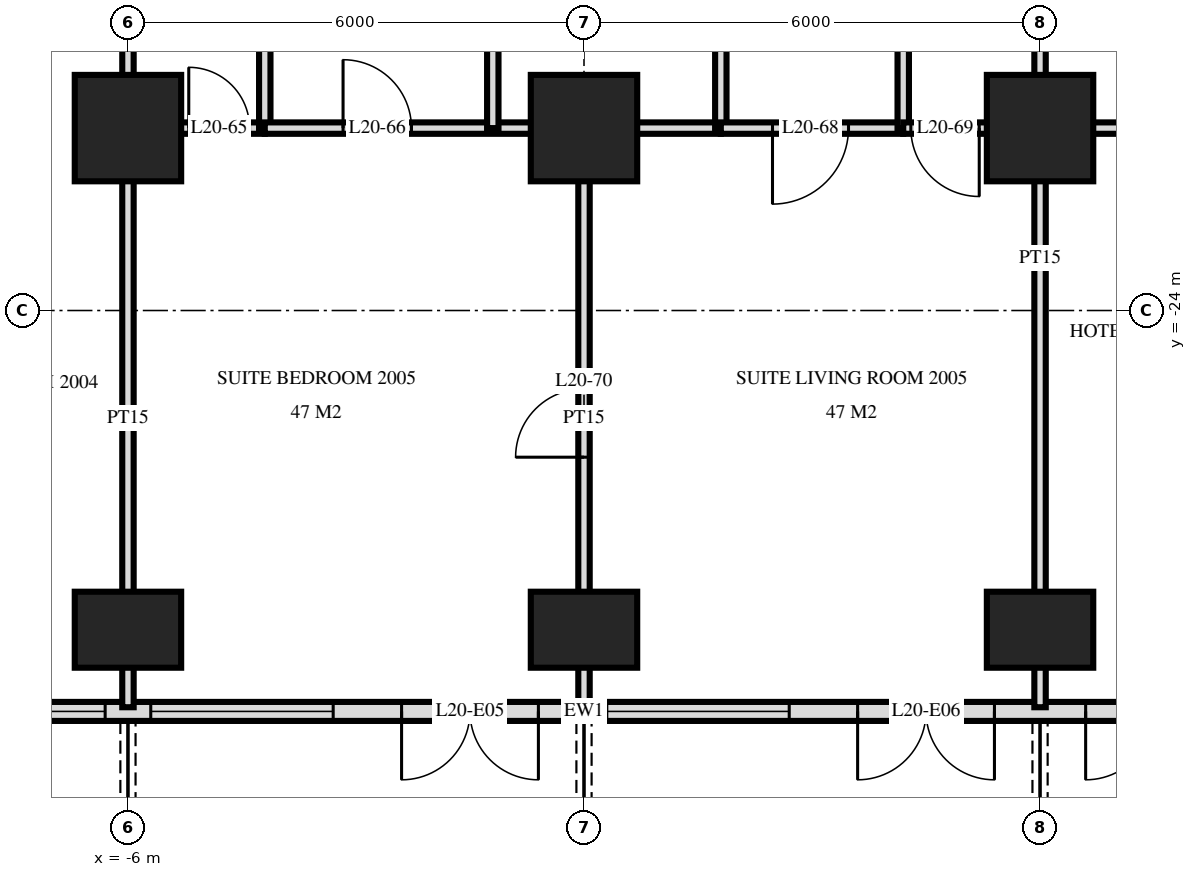
"""IFC4 building model, lengths in metres.
Left out: names, types, materials, properties, quantities, classifications, styles, units other than length and angle.
Written with IfcOpenShell. Run it as: python <this file> out.ifc"""

import sys

from ifc_helpers import new_model, si_unit, direction, frame, frame_2d, origin, origin_2d, place, context, subcontext, project, spatial, rectangle, extrude, element, fill, save


model = new_model("IFC4")
c1 = context("Model", 3, precision=1e-05, world=origin(), true_north=direction((0.0, 1.0)))
c2 = subcontext(c1, "Body", "Model", "MODEL_VIEW")
j1 = project(units=[si_unit("LENGTHUNIT", "METRE"), si_unit("PLANEANGLEUNIT", "RADIAN")], contexts=[c1])
p1 = place(None, origin())
s1 = spatial("IfcSite", under=j1, at=p1, CompositionType="ELEMENT")
p2 = place(p1, origin())
s2 = spatial("IfcBuilding", under=s1, at=p2, CompositionType="ELEMENT")
p3 = place(p2, frame((0.0, 0.0, 81.6)))
s3 = spatial("IfcBuildingStorey", under=s2, at=p3, CompositionType="ELEMENT", Elevation=81.6)
p4 = place(p3, frame((-6.0, -28.2, 0.0), z_axis=(0.0, 0.0, 1.0), x_axis=(1.0, 0.0, 0.0)))
e1 = element("IfcColumn", 1, at=p4, inside=s3, PredefinedType="COLUMN", context=c2, shape_type="SweptSolid", body=[
    extrude(rectangle(XDim=1.4, YDim=1.0, at=origin_2d()), origin(), (0.0, 0.0, 1.0), 3.6),
])
p5 = place(p3, frame((-6.0, -21.6, 0.0), z_axis=(0.0, 0.0, 1.0), x_axis=(1.0, 0.0, 0.0)))
e2 = element("IfcColumn", 2, at=p5, inside=s3, PredefinedType="COLUMN", context=c2, shape_type="SweptSolid", body=[
    extrude(rectangle(XDim=1.4, YDim=1.4, at=origin_2d()), origin(), (0.0, 0.0, 1.0), 3.6),
])
p6 = place(p3, frame((0.0, -28.2, 0.0), z_axis=(0.0, 0.0, 1.0), x_axis=(1.0, 0.0, 0.0)))
e3 = element("IfcColumn", 3, at=p6, inside=s3, PredefinedType="COLUMN", context=c2, shape_type="SweptSolid", body=[
    extrude(rectangle(XDim=1.4, YDim=1.0, at=origin_2d()), origin(), (0.0, 0.0, 1.0), 3.6),
])
p7 = place(p3, frame((0.0, -21.6, 0.0), z_axis=(0.0, 0.0, 1.0), x_axis=(1.0, 0.0, 0.0)))
e4 = element("IfcColumn", 4, at=p7, inside=s3, PredefinedType="COLUMN", context=c2, shape_type="SweptSolid", body=[
    extrude(rectangle(XDim=1.4, YDim=1.4, at=origin_2d()), origin(), (0.0, 0.0, 1.0), 3.6),
])
p8 = place(p3, frame((6.0, -28.2, 0.0), z_axis=(0.0, 0.0, 1.0), x_axis=(1.0, 0.0, 0.0)))
e5 = element("IfcColumn", 5, at=p8, inside=s3, PredefinedType="COLUMN", context=c2, shape_type="SweptSolid", body=[
    extrude(rectangle(XDim=1.4, YDim=1.0, at=origin_2d()), origin(), (0.0, 0.0, 1.0), 3.6),
])
p9 = place(p3, frame((6.0, -21.6, 0.0), z_axis=(0.0, 0.0, 1.0), x_axis=(1.0, 0.0, 0.0)))
e6 = element("IfcColumn", 6, at=p9, inside=s3, PredefinedType="COLUMN", context=c2, shape_type="SweptSolid", body=[
    extrude(rectangle(XDim=1.4, YDim=1.4, at=origin_2d()), origin(), (0.0, 0.0, 1.0), 3.6),
])
p10 = place(p3, frame((-28.775, -29.275, 0.0), z_axis=(0.0, 0.0, 1.0), x_axis=(1.0, 0.0, 0.0)))
e7 = element("IfcWall", 7, at=p10, inside=s3, PredefinedType="SOLIDWALL", context=c2, shape_type="SweptSolid", body=[
    extrude(rectangle(XDim=57.551, YDim=0.25, at=frame_2d((28.775, 0.0))), origin(), (0.0, 0.0, 1.0), 3.32),
])
p11 = place(p10, frame((0.575, 0.0, 0.0)))
e8 = element("IfcOpeningElement", 8, at=p11, cuts=e7, PredefinedType="OPENING", context=c2, shape_type="SweptSolid", body=[
    extrude(rectangle(XDim=1.8, YDim=2.4, at=frame_2d((0.9, 1.2))), frame((0.0, 0.135, 0.0), z_axis=(0.0, -1.0, 0.0), x_axis=(1.0, 0.0, 0.0)), (0.0, 0.0, 1.0), 0.27),
])
p12 = place(p10, frame((5.375, 0.0, 0.0)))
e9 = element("IfcOpeningElement", 9, at=p12, cuts=e7, PredefinedType="OPENING", context=c2, shape_type="SweptSolid", body=[
    extrude(rectangle(XDim=1.8, YDim=2.4, at=frame_2d((0.9, 1.2))), frame((0.0, 0.135, 0.0), z_axis=(0.0, -1.0, 0.0), x_axis=(1.0, 0.0, 0.0)), (0.0, 0.0, 1.0), 0.27),
])
p13 = place(p10, frame((8.075, 0.0, 0.3)))
e10 = element("IfcOpeningElement", 10, at=p13, cuts=e7, PredefinedType="OPENING", context=c2, shape_type="SweptSolid", body=[
    extrude(rectangle(XDim=2.4, YDim=2.1, at=frame_2d((1.2, 1.05))), frame((0.0, 0.135, 0.0), z_axis=(0.0, -1.0, 0.0), x_axis=(1.0, 0.0, 0.0)), (0.0, 0.0, 1.0), 0.27),
])
p14 = place(p10, frame((12.875, 0.0, 0.0)))
e11 = element("IfcOpeningElement", 11, at=p14, cuts=e7, PredefinedType="OPENING", context=c2, shape_type="SweptSolid", body=[
    extrude(rectangle(XDim=1.8, YDim=2.4, at=frame_2d((0.9, 1.2))), frame((0.0, 0.135, 0.0), z_axis=(0.0, -1.0, 0.0), x_axis=(1.0, 0.0, 0.0)), (0.0, 0.0, 1.0), 0.27),
])
p15 = place(p10, frame((17.375, 0.0, 0.0)))
e12 = element("IfcOpeningElement", 12, at=p15, cuts=e7, PredefinedType="OPENING", context=c2, shape_type="SweptSolid", body=[
    extrude(rectangle(XDim=1.8, YDim=2.4, at=frame_2d((0.9, 1.2))), frame((0.0, 0.135, 0.0), z_axis=(0.0, -1.0, 0.0), x_axis=(1.0, 0.0, 0.0)), (0.0, 0.0, 1.0), 0.27),
])
p16 = place(p10, frame((20.075, 0.0, 0.3)))
e13 = element("IfcOpeningElement", 13, at=p16, cuts=e7, PredefinedType="OPENING", context=c2, shape_type="SweptSolid", body=[
    extrude(rectangle(XDim=2.4, YDim=2.1, at=frame_2d((1.2, 1.05))), frame((0.0, 0.135, 0.0), z_axis=(0.0, -1.0, 0.0), x_axis=(1.0, 0.0, 0.0)), (0.0, 0.0, 1.0), 0.27),
])
p17 = place(p10, frame((23.075, 0.0, 0.3)))
e14 = element("IfcOpeningElement", 14, at=p17, cuts=e7, PredefinedType="OPENING", context=c2, shape_type="SweptSolid", body=[
    extrude(rectangle(XDim=2.4, YDim=2.1, at=frame_2d((1.2, 1.05))), frame((0.0, 0.135, 0.0), z_axis=(0.0, -1.0, 0.0), x_axis=(1.0, 0.0, 0.0)), (0.0, 0.0, 1.0), 0.27),
])
p18 = place(p10, frame((26.375, 0.0, 0.0)))
e15 = element("IfcOpeningElement", 15, at=p18, cuts=e7, PredefinedType="OPENING", context=c2, shape_type="SweptSolid", body=[
    extrude(rectangle(XDim=1.8, YDim=2.4, at=frame_2d((0.9, 1.2))), frame((0.0, 0.135, 0.0), z_axis=(0.0, -1.0, 0.0), x_axis=(1.0, 0.0, 0.0)), (0.0, 0.0, 1.0), 0.27),
])
p19 = place(p10, frame((29.075, 0.0, 0.3)))
e16 = element("IfcOpeningElement", 16, at=p19, cuts=e7, PredefinedType="OPENING", context=c2, shape_type="SweptSolid", body=[
    extrude(rectangle(XDim=2.4, YDim=2.1, at=frame_2d((1.2, 1.05))), frame((0.0, 0.135, 0.0), z_axis=(0.0, -1.0, 0.0), x_axis=(1.0, 0.0, 0.0)), (0.0, 0.0, 1.0), 0.27),
])
p20 = place(p10, frame((32.375, 0.0, 0.0)))
e17 = element("IfcOpeningElement", 17, at=p20, cuts=e7, PredefinedType="OPENING", context=c2, shape_type="SweptSolid", body=[
    extrude(rectangle(XDim=1.8, YDim=2.4, at=frame_2d((0.9, 1.2))), frame((0.0, 0.135, 0.0), z_axis=(0.0, -1.0, 0.0), x_axis=(1.0, 0.0, 0.0)), (0.0, 0.0, 1.0), 0.27),
])
p21 = place(p10, frame((35.375, 0.0, 0.0)))
e18 = element("IfcOpeningElement", 18, at=p21, cuts=e7, PredefinedType="OPENING", context=c2, shape_type="SweptSolid", body=[
    extrude(rectangle(XDim=1.8, YDim=2.4, at=frame_2d((0.9, 1.2))), frame((0.0, 0.135, 0.0), z_axis=(0.0, -1.0, 0.0), x_axis=(1.0, 0.0, 0.0)), (0.0, 0.0, 1.0), 0.27),
])
p22 = place(p10, frame((38.075, 0.0, 0.3)))
e19 = element("IfcOpeningElement", 19, at=p22, cuts=e7, PredefinedType="OPENING", context=c2, shape_type="SweptSolid", body=[
    extrude(rectangle(XDim=2.4, YDim=2.1, at=frame_2d((1.2, 1.05))), frame((0.0, 0.135, 0.0), z_axis=(0.0, -1.0, 0.0), x_axis=(1.0, 0.0, 0.0)), (0.0, 0.0, 1.0), 0.27),
])
p23 = place(p10, frame((41.375, 0.0, 0.0)))
e20 = element("IfcOpeningElement", 20, at=p23, cuts=e7, PredefinedType="OPENING", context=c2, shape_type="SweptSolid", body=[
    extrude(rectangle(XDim=1.8, YDim=2.4, at=frame_2d((0.9, 1.2))), frame((0.0, 0.135, 0.0), z_axis=(0.0, -1.0, 0.0), x_axis=(1.0, 0.0, 0.0)), (0.0, 0.0, 1.0), 0.27),
])
p24 = place(p10, frame((44.075, 0.0, 0.3)))
e21 = element("IfcOpeningElement", 21, at=p24, cuts=e7, PredefinedType="OPENING", context=c2, shape_type="SweptSolid", body=[
    extrude(rectangle(XDim=2.4, YDim=2.1, at=frame_2d((1.2, 1.05))), frame((0.0, 0.135, 0.0), z_axis=(0.0, -1.0, 0.0), x_axis=(1.0, 0.0, 0.0)), (0.0, 0.0, 1.0), 0.27),
])
p25 = place(p10, frame((47.075, 0.0, 0.3)))
e22 = element("IfcOpeningElement", 22, at=p25, cuts=e7, PredefinedType="OPENING", context=c2, shape_type="SweptSolid", body=[
    extrude(rectangle(XDim=2.4, YDim=2.1, at=frame_2d((1.2, 1.05))), frame((0.0, 0.135, 0.0), z_axis=(0.0, -1.0, 0.0), x_axis=(1.0, 0.0, 0.0)), (0.0, 0.0, 1.0), 0.27),
])
p26 = place(p10, frame((50.375, 0.0, 0.0)))
e23 = element("IfcOpeningElement", 23, at=p26, cuts=e7, PredefinedType="OPENING", context=c2, shape_type="SweptSolid", body=[
    extrude(rectangle(XDim=1.8, YDim=2.4, at=frame_2d((0.9, 1.2))), frame((0.0, 0.135, 0.0), z_axis=(0.0, -1.0, 0.0), x_axis=(1.0, 0.0, 0.0)), (0.0, 0.0, 1.0), 0.27),
])
p27 = place(p10, frame((53.375, 0.0, 0.0)))
e24 = element("IfcOpeningElement", 24, at=p27, cuts=e7, PredefinedType="OPENING", context=c2, shape_type="SweptSolid", body=[
    extrude(rectangle(XDim=1.8, YDim=2.4, at=frame_2d((0.9, 1.2))), frame((0.0, 0.135, 0.0), z_axis=(0.0, -1.0, 0.0), x_axis=(1.0, 0.0, 0.0)), (0.0, 0.0, 1.0), 0.27),
])
p28 = place(p3, frame((6.0, -29.22, 0.0), z_axis=(0.0, 0.0, 1.0), x_axis=(0.0, 1.0, 0.0)))
e25 = element("IfcWall", 25, at=p28, inside=s3, PredefinedType="PARTITIONING", context=c2, shape_type="SweptSolid", body=[
    extrude(rectangle(XDim=11.82, YDim=0.15, at=frame_2d((5.91, 0.0))), origin(), (0.0, 0.0, 1.0), 3.32),
])
p29 = place(p3, frame((4.2, -21.6, 0.0), z_axis=(0.0, 0.0, 1.0), x_axis=(0.0, 1.0, 0.0)))
e26 = element("IfcWall", 26, at=p29, inside=s3, PredefinedType="PARTITIONING", context=c2, shape_type="SweptSolid", body=[
    extrude(rectangle(XDim=4.2, YDim=0.15, at=frame_2d((2.1, 0.0))), origin(), (0.0, 0.0, 1.0), 3.32),
])
p30 = place(p3, frame((1.8, -21.6, 0.0), z_axis=(0.0, 0.0, 1.0), x_axis=(0.0, 1.0, 0.0)))
e27 = element("IfcWall", 27, at=p30, inside=s3, PredefinedType="PARTITIONING", context=c2, shape_type="SweptSolid", body=[
    extrude(rectangle(XDim=4.2, YDim=0.15, at=frame_2d((2.1, 0.0))), origin(), (0.0, 0.0, 1.0), 3.32),
])
p31 = place(p30, frame((1.58, 0.0, 0.0)))
e28 = element("IfcOpeningElement", 28, at=p31, cuts=e27, PredefinedType="OPENING", context=c2, shape_type="SweptSolid", body=[
    extrude(rectangle(XDim=1.0, YDim=2.1, at=frame_2d((0.5, 1.05))), frame((0.0, 0.085, 0.0), z_axis=(0.0, -1.0, 0.0), x_axis=(1.0, 0.0, 0.0)), (0.0, 0.0, 1.0), 0.17),
])
p32 = place(p3, frame((0.0, -29.22, 0.0), z_axis=(0.0, 0.0, 1.0), x_axis=(0.0, 1.0, 0.0)))
e29 = element("IfcWall", 29, at=p32, inside=s3, PredefinedType="PARTITIONING", context=c2, shape_type="SweptSolid", body=[
    extrude(rectangle(XDim=7.62, YDim=0.15, at=frame_2d((3.81, 0.0))), origin(), (0.0, 0.0, 1.0), 3.32),
])
p33 = place(p32, frame((3.29, 0.0, 0.0)))
e30 = element("IfcOpeningElement", 30, at=p33, cuts=e29, PredefinedType="OPENING", context=c2, shape_type="SweptSolid", body=[
    extrude(rectangle(XDim=0.9, YDim=2.1, at=frame_2d((0.45, 1.05))), frame((0.0, 0.085, 0.0), z_axis=(0.0, -1.0, 0.0), x_axis=(1.0, 0.0, 0.0)), (0.0, 0.0, 1.0), 0.17),
])
p34 = place(p3, frame((-1.2, -21.6, 0.0), z_axis=(0.0, 0.0, 1.0), x_axis=(0.0, 1.0, 0.0)))
e31 = element("IfcWall", 31, at=p34, inside=s3, PredefinedType="PARTITIONING", context=c2, shape_type="SweptSolid", body=[
    extrude(rectangle(XDim=4.2, YDim=0.15, at=frame_2d((2.1, 0.0))), origin(), (0.0, 0.0, 1.0), 3.32),
])
p35 = place(p3, frame((-4.2, -21.6, 0.0), z_axis=(0.0, 0.0, 1.0), x_axis=(0.0, 1.0, 0.0)))
e32 = element("IfcWall", 32, at=p35, inside=s3, PredefinedType="PLUMBINGWALL", context=c2, shape_type="SweptSolid", body=[
    extrude(rectangle(XDim=4.2, YDim=0.15, at=frame_2d((2.1, 0.0))), origin(), (0.0, 0.0, 1.0), 3.32),
])
p36 = place(p3, frame((-6.0, -29.22, 0.0), z_axis=(0.0, 0.0, 1.0), x_axis=(0.0, 1.0, 0.0)))
e33 = element("IfcWall", 33, at=p36, inside=s3, PredefinedType="PARTITIONING", context=c2, shape_type="SweptSolid", body=[
    extrude(rectangle(XDim=7.62, YDim=0.15, at=frame_2d((3.81, 0.0))), origin(), (0.0, 0.0, 1.0), 3.32),
])
p37 = place(p3, frame((-6.0, -21.6, 0.0), z_axis=(0.0, 0.0, 1.0), x_axis=(0.0, 1.0, 0.0)))
e34 = element("IfcWall", 34, at=p37, inside=s3, PredefinedType="PLUMBINGWALL", context=c2, shape_type="SweptSolid", body=[
    extrude(rectangle(XDim=4.2, YDim=0.15, at=frame_2d((2.1, 0.0))), origin(), (0.0, 0.0, 1.0), 3.32),
])
p38 = place(p3, frame((1.8, -21.6, 0.0), z_axis=(0.0, 0.0, 1.0), x_axis=(1.0, 0.0, 0.0)))
e35 = element("IfcWall", 35, at=p38, inside=s3, PredefinedType="PARTITIONING", context=c2, shape_type="SweptSolid", body=[
    extrude(rectangle(XDim=2.4, YDim=0.15, at=frame_2d((1.2, 0.0))), origin(), (0.0, 0.0, 1.0), 3.32),
])
p39 = place(p38, frame((0.68, 0.0, 0.0)))
e36 = element("IfcOpeningElement", 36, at=p39, cuts=e35, PredefinedType="OPENING", context=c2, shape_type="SweptSolid", body=[
    extrude(rectangle(XDim=1.0, YDim=2.1, at=frame_2d((0.5, 1.05))), frame((0.0, 0.085, 0.0), z_axis=(0.0, -1.0, 0.0), x_axis=(1.0, 0.0, 0.0)), (0.0, 0.0, 1.0), 0.17),
])
p40 = place(p3, frame((-4.2, -21.6, 0.0), z_axis=(0.0, 0.0, 1.0), x_axis=(1.0, 0.0, 0.0)))
e37 = element("IfcWall", 37, at=p40, inside=s3, PredefinedType="PARTITIONING", context=c2, shape_type="SweptSolid", body=[
    extrude(rectangle(XDim=6.0, YDim=0.15, at=frame_2d((3.0, 0.0))), origin(), (0.0, 0.0, 1.0), 3.32),
])
p41 = place(p40, frame((1.03, 0.0, 0.0)))
e38 = element("IfcOpeningElement", 38, at=p41, cuts=e37, PredefinedType="OPENING", context=c2, shape_type="SweptSolid", body=[
    extrude(rectangle(XDim=0.9, YDim=2.1, at=frame_2d((0.45, 1.05))), frame((0.0, 0.085, 0.0), z_axis=(0.0, -1.0, 0.0), x_axis=(1.0, 0.0, 0.0)), (0.0, 0.0, 1.0), 0.17),
])
p42 = place(p3, frame((4.2, -21.6, 0.0), z_axis=(0.0, 0.0, 1.0), x_axis=(1.0, 0.0, 0.0)))
e39 = element("IfcWall", 39, at=p42, inside=s3, PredefinedType="PARTITIONING", context=c2, shape_type="SweptSolid", body=[
    extrude(rectangle(XDim=3.5, YDim=0.15, at=frame_2d((1.75, 0.0))), origin(), (0.0, 0.0, 1.0), 3.32),
])
p43 = place(p42, frame((0.1, 0.0, 0.0)))
e40 = element("IfcOpeningElement", 40, at=p43, cuts=e39, PredefinedType="OPENING", context=c2, shape_type="SweptSolid", body=[
    extrude(rectangle(XDim=0.9, YDim=2.1, at=frame_2d((0.45, 1.05))), frame((0.0, 0.085, 0.0), z_axis=(0.0, -1.0, 0.0), x_axis=(1.0, 0.0, 0.0)), (0.0, 0.0, 1.0), 0.17),
])
p44 = place(p3, frame((-6.0, -21.6, 0.0), z_axis=(0.0, 0.0, 1.0), x_axis=(1.0, 0.0, 0.0)))
e41 = element("IfcWall", 41, at=p44, inside=s3, PredefinedType="PLUMBINGWALL", context=c2, shape_type="SweptSolid", body=[
    extrude(rectangle(XDim=1.8, YDim=0.15, at=frame_2d((0.9, 0.0))), origin(), (0.0, 0.0, 1.0), 3.32),
])
p45 = place(p44, frame((0.8, 0.0, 0.0)))
e42 = element("IfcOpeningElement", 42, at=p45, cuts=e41, PredefinedType="OPENING", context=c2, shape_type="SweptSolid", body=[
    extrude(rectangle(XDim=0.8, YDim=2.1, at=frame_2d((0.4, 1.05))), frame((0.0, 0.085, 0.0), z_axis=(0.0, -1.0, 0.0), x_axis=(1.0, 0.0, 0.0)), (0.0, 0.0, 1.0), 0.17),
])
p46 = place(p16, origin())
e43 = element("IfcWindow", 43, at=p46, inside=s3, PartitioningType="SINGLE_PANEL", PredefinedType="WINDOW", context=c2, shape_type="SweptSolid", body=[
    extrude(rectangle(XDim=2.4, YDim=2.1, at=frame_2d((1.2, 1.05))), frame((0.0, 0.03, 0.0), z_axis=(0.0, -1.0, 0.0), x_axis=(1.0, 0.0, 0.0)), (0.0, 0.0, 1.0), 0.06),
])
fill(e13, e43)
p47 = place(p17, origin())
e44 = element("IfcWindow", 44, at=p47, inside=s3, PartitioningType="SINGLE_PANEL", PredefinedType="WINDOW", context=c2, shape_type="SweptSolid", body=[
    extrude(rectangle(XDim=2.4, YDim=2.1, at=frame_2d((1.2, 1.05))), frame((0.0, 0.03, 0.0), z_axis=(0.0, -1.0, 0.0), x_axis=(1.0, 0.0, 0.0)), (0.0, 0.0, 1.0), 0.06),
])
fill(e14, e44)
p48 = place(p18, frame((0.9, 0.0, 0.0), z_axis=(0.0, 0.0, 1.0), x_axis=(-1.0, 0.0, 0.0)))
e45 = element("IfcDoor", 45, at=p48, inside=s3, OperationType="DOUBLE_DOOR_SINGLE_SWING", PredefinedType="DOOR", context=c2, shape_type="SweptSolid", body=[
    extrude(rectangle(XDim=1.8, YDim=2.4, at=frame_2d((0.0, 1.2))), frame((0.0, -0.025, 0.0), z_axis=(0.0, 1.0, 0.0), x_axis=(-1.0, 0.0, 0.0)), (0.0, 0.0, 1.0), 0.05),
])
fill(e15, e45)
p49 = place(p19, origin())
e46 = element("IfcWindow", 46, at=p49, inside=s3, PartitioningType="SINGLE_PANEL", PredefinedType="WINDOW", context=c2, shape_type="SweptSolid", body=[
    extrude(rectangle(XDim=2.4, YDim=2.1, at=frame_2d((1.2, 1.05))), frame((0.0, 0.03, 0.0), z_axis=(0.0, -1.0, 0.0), x_axis=(1.0, 0.0, 0.0)), (0.0, 0.0, 1.0), 0.06),
])
fill(e16, e46)
p50 = place(p20, frame((0.9, 0.0, 0.0), z_axis=(0.0, 0.0, 1.0), x_axis=(-1.0, 0.0, 0.0)))
e47 = element("IfcDoor", 47, at=p50, inside=s3, OperationType="DOUBLE_DOOR_SINGLE_SWING", PredefinedType="DOOR", context=c2, shape_type="SweptSolid", body=[
    extrude(rectangle(XDim=1.8, YDim=2.4, at=frame_2d((0.0, 1.2))), frame((0.0, -0.025, 0.0), z_axis=(0.0, 1.0, 0.0), x_axis=(-1.0, 0.0, 0.0)), (0.0, 0.0, 1.0), 0.05),
])
fill(e17, e47)
p51 = place(p21, frame((0.9, 0.0, 0.0), z_axis=(0.0, 0.0, 1.0), x_axis=(-1.0, 0.0, 0.0)))
e48 = element("IfcDoor", 48, at=p51, inside=s3, OperationType="DOUBLE_DOOR_SINGLE_SWING", PredefinedType="DOOR", context=c2, shape_type="SweptSolid", body=[
    extrude(rectangle(XDim=1.8, YDim=2.4, at=frame_2d((0.0, 1.2))), frame((0.0, -0.025, 0.0), z_axis=(0.0, 1.0, 0.0), x_axis=(-1.0, 0.0, 0.0)), (0.0, 0.0, 1.0), 0.05),
])
fill(e18, e48)
p52 = place(p45, origin())
e49 = element("IfcDoor", 49, at=p52, inside=s3, OperationType="SINGLE_SWING_RIGHT", PredefinedType="DOOR", context=c2, shape_type="SweptSolid", body=[
    extrude(rectangle(XDim=0.8, YDim=2.1, at=frame_2d((0.4, 1.05))), frame((0.0, 0.025, 0.0), z_axis=(0.0, -1.0, 0.0), x_axis=(1.0, 0.0, 0.0)), (0.0, 0.0, 1.0), 0.05),
])
fill(e42, e49)
p53 = place(p41, origin())
e50 = element("IfcDoor", 50, at=p53, inside=s3, OperationType="SINGLE_SWING_RIGHT", PredefinedType="DOOR", context=c2, shape_type="SweptSolid", body=[
    extrude(rectangle(XDim=0.9, YDim=2.1, at=frame_2d((0.45, 1.05))), frame((0.0, 0.025, 0.0), z_axis=(0.0, -1.0, 0.0), x_axis=(1.0, 0.0, 0.0)), (0.0, 0.0, 1.0), 0.05),
])
fill(e38, e50)
p54 = place(p39, frame((0.5, 0.0, 0.0), z_axis=(0.0, 0.0, 1.0), x_axis=(-1.0, 0.0, 0.0)))
e51 = element("IfcDoor", 51, at=p54, inside=s3, OperationType="SINGLE_SWING_LEFT", PredefinedType="DOOR", context=c2, shape_type="SweptSolid", body=[
    extrude(rectangle(XDim=1.0, YDim=2.1, at=frame_2d((0.0, 1.05))), frame((0.0, -0.025, 0.0), z_axis=(0.0, 1.0, 0.0), x_axis=(-1.0, 0.0, 0.0)), (0.0, 0.0, 1.0), 0.05),
])
fill(e36, e51)
p55 = place(p43, frame((0.45, 0.0, 0.0), z_axis=(0.0, 0.0, 1.0), x_axis=(-1.0, 0.0, 0.0)))
e52 = element("IfcDoor", 52, at=p55, inside=s3, OperationType="SINGLE_SWING_RIGHT", PredefinedType="DOOR", context=c2, shape_type="SweptSolid", body=[
    extrude(rectangle(XDim=0.9, YDim=2.1, at=frame_2d((0.0, 1.05))), frame((0.0, -0.025, 0.0), z_axis=(0.0, 1.0, 0.0), x_axis=(-1.0, 0.0, 0.0)), (0.0, 0.0, 1.0), 0.05),
])
fill(e40, e52)
p56 = place(p33, origin())
e53 = element("IfcDoor", 53, at=p56, inside=s3, OperationType="SINGLE_SWING_RIGHT", PredefinedType="DOOR", context=c2, shape_type="SweptSolid", body=[
    extrude(rectangle(XDim=0.9, YDim=2.1, at=frame_2d((0.45, 1.05))), frame((0.0, 0.025, 0.0), z_axis=(0.0, -1.0, 0.0), x_axis=(1.0, 0.0, 0.0)), (0.0, 0.0, 1.0), 0.05),
])
fill(e30, e53)
save(model, sys.argv[1])
